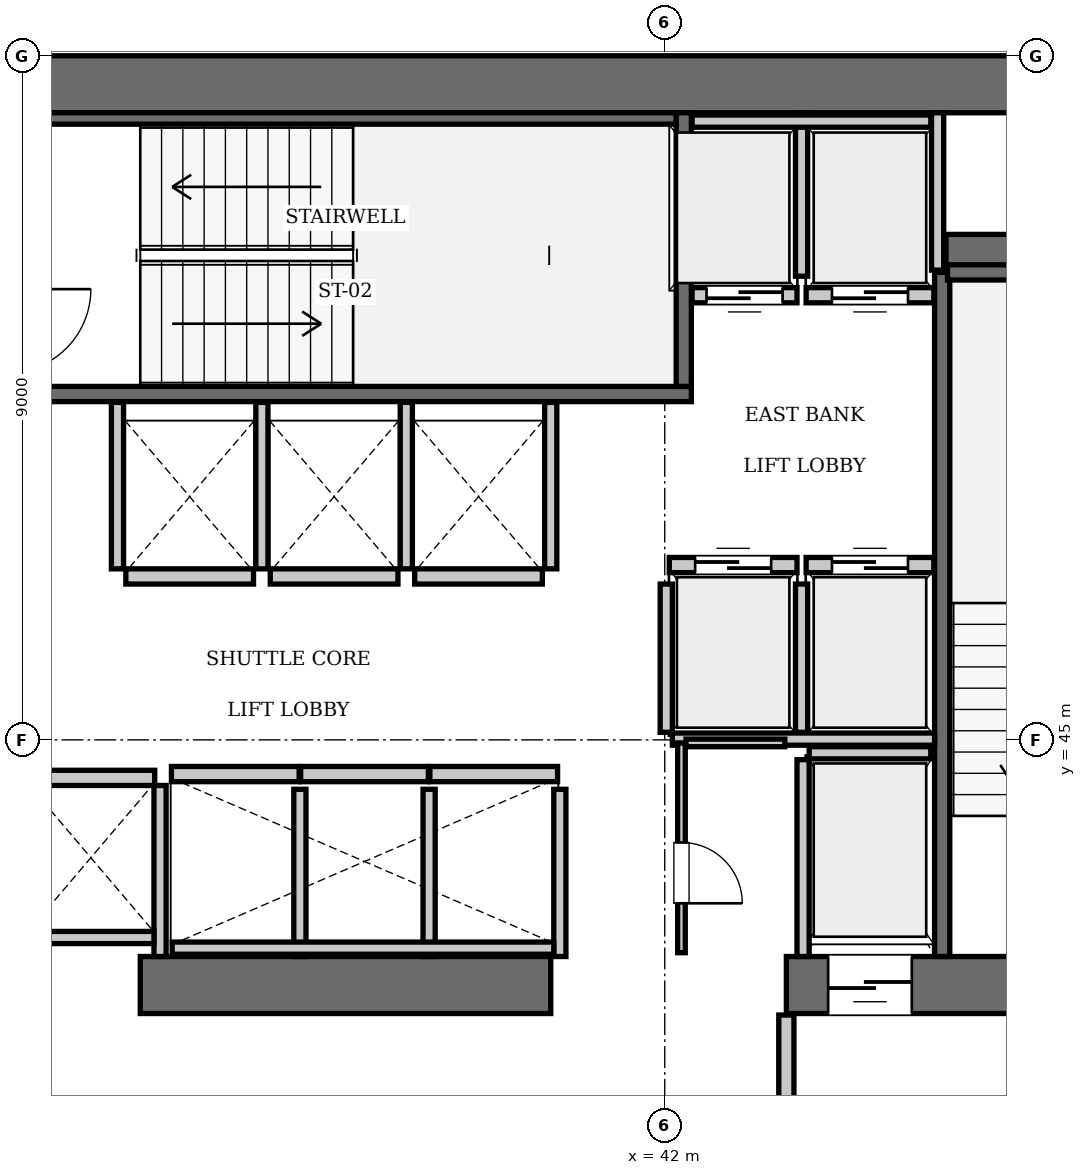
"""IFC4 building model, lengths in metres.
Left out: names, types, materials, properties, quantities, classifications, styles, units other than length and angle.
Written with IfcOpenShell. Run it as: python <this file> out.ifc"""

import sys

from ifc_helpers import new_model, si_unit, direction, frame, frame_2d, origin, place, context, subcontext, project, spatial, rectangle, extrude, element, fill, save


model = new_model("IFC4")
c1 = context("Model", 3, precision=1e-05, world=origin(), true_north=direction((0.0, 1.0)))
c2 = subcontext(c1, "Body", "Model", "MODEL_VIEW")
j1 = project(units=[si_unit("LENGTHUNIT", "METRE"), si_unit("PLANEANGLEUNIT", "RADIAN")], contexts=[c1])
p1 = place(None, origin())
s1 = spatial("IfcSite", under=j1, at=p1, CompositionType="ELEMENT")
p2 = place(p1, origin())
s2 = spatial("IfcBuilding", under=s1, at=p2, CompositionType="ELEMENT")
p3 = place(p2, frame((0.0, 0.0, 212.1)))
s3 = spatial("IfcBuildingStorey", under=s2, at=p3, CompositionType="ELEMENT", Elevation=212.1)
p4 = place(p3, frame((25.2, 53.625, 0.0), z_axis=(0.0, 0.0, 1.0), x_axis=(1.0, 0.0, 0.0)))
e1 = element("IfcWall", 1, at=p4, inside=s3, PredefinedType="SHEAR", context=c2, shape_type="SweptSolid", body=[
    extrude(rectangle(XDim=25.2, YDim=0.75, at=frame_2d((12.6, 0.0))), origin(), (0.0, 0.0, 1.0), 3.85),
])
p5 = place(p3, frame((35.1, 41.775, 0.0), z_axis=(0.0, 0.0, 1.0), x_axis=(1.0, 0.0, 0.0)))
e2 = element("IfcWall", 2, at=p5, inside=s3, PredefinedType="SHEAR", context=c2, shape_type="SweptSolid", body=[
    extrude(rectangle(XDim=5.4, YDim=0.75, at=frame_2d((2.7, 0.0))), origin(), (0.0, 0.0, 1.0), 3.85),
])
p6 = place(p3, frame((43.6, 41.775, 0.0), z_axis=(0.0, 0.0, 1.0), x_axis=(1.0, 0.0, 0.0)))
e3 = element("IfcWall", 3, at=p6, inside=s3, PredefinedType="SHEAR", context=c2, shape_type="SweptSolid", body=[
    extrude(rectangle(XDim=6.8, YDim=0.75, at=frame_2d((3.4, 0.0))), origin(), (0.0, 0.0, 1.0), 3.85),
])
p7 = place(p6, frame((3.9, 0.0, 0.0)))
e4 = element("IfcOpeningElement", 4, at=p7, cuts=e3, PredefinedType="OPENING", context=c2, shape_type="SweptSolid", body=[
    extrude(rectangle(XDim=1.15, YDim=2.15, at=frame_2d((0.575, 1.075))), frame((0.0, 0.385, 0.0), z_axis=(0.0, -1.0, 0.0), x_axis=(1.0, 0.0, 0.0)), (0.0, 0.0, 1.0), 0.77),
])
p8 = place(p6, frame((0.55, 0.0, 0.0)))
e5 = element("IfcOpeningElement", 5, at=p8, cuts=e3, PredefinedType="OPENING", context=c2, shape_type="SweptSolid", body=[
    extrude(rectangle(XDim=1.1, YDim=2.2, at=frame_2d((0.55, 1.1))), frame((0.0, 0.385, 0.0), z_axis=(0.0, -1.0, 0.0), x_axis=(1.0, 0.0, 0.0)), (0.0, 0.0, 1.0), 0.77),
])
p9 = place(p3, frame((45.7, 51.4, 0.0), z_axis=(0.0, 0.0, 1.0), x_axis=(1.0, 0.0, 0.0)))
e6 = element("IfcWall", 6, at=p9, inside=s3, PredefinedType="SHEAR", context=c2, shape_type="SweptSolid", body=[
    extrude(rectangle(XDim=3.95, YDim=0.5, at=frame_2d((1.975, 0.0))), origin(), (0.0, 0.0, 1.0), 3.85),
])
p10 = place(p3, frame((33.25, 49.55, 0.0), z_axis=(0.0, 0.0, 1.0), x_axis=(1.0, 0.0, 0.0)))
e7 = element("IfcWall", 7, at=p10, inside=s3, PredefinedType="SOLIDWALL", context=c2, shape_type="SweptSolid", body=[
    extrude(rectangle(XDim=9.1, YDim=0.2, at=frame_2d((4.55, 0.0))), origin(), (0.0, 0.0, 1.0), 3.61),
])
p11 = place(p3, frame((42.25, 49.65, 0.0), z_axis=(0.0, 0.0, 1.0), x_axis=(0.0, 1.0, 0.0)))
e8 = element("IfcWall", 8, at=p11, inside=s3, PredefinedType="SOLIDWALL", context=c2, shape_type="SweptSolid", body=[
    extrude(rectangle(XDim=3.6, YDim=0.2, at=frame_2d((1.8, 0.0))), origin(), (0.0, 0.0, 1.0), 3.61),
])
p12 = place(p3, frame((33.45, 53.175, 0.0), z_axis=(0.0, 0.0, 1.0), x_axis=(1.0, 0.0, 0.0)))
e9 = element("IfcWall", 9, at=p12, inside=s3, PredefinedType="SOLIDWALL", context=c2, shape_type="SweptSolid", body=[
    extrude(rectangle(XDim=8.7, YDim=0.15, at=frame_2d((4.35, 0.0))), origin(), (0.0, 0.0, 1.0), 3.61),
])
p13 = place(p3, frame((45.65, 42.15, 0.0), z_axis=(0.0, 0.0, 1.0), x_axis=(0.0, 1.0, 0.0)))
e10 = element("IfcWall", 10, at=p13, inside=s3, PredefinedType="SOLIDWALL", context=c2, shape_type="SweptSolid", body=[
    extrude(rectangle(XDim=9.0, YDim=0.2, at=frame_2d((4.5, 0.0))), origin(), (0.0, 0.0, 1.0), 3.61),
])
p14 = place(p3, frame((45.72, 51.15, 0.0), z_axis=(0.0, 0.0, 1.0), x_axis=(1.0, 0.0, 0.0)))
e11 = element("IfcWall", 11, at=p14, inside=s3, PredefinedType="SOLIDWALL", context=c2, shape_type="SweptSolid", body=[
    extrude(rectangle(XDim=3.5, YDim=0.2, at=frame_2d((1.75, 0.0))), origin(), (0.0, 0.0, 1.0), 3.61),
])
p15 = place(p3, frame((42.06, 47.3, 0.0), z_axis=(0.0, 0.0, 1.0), x_axis=(1.0, 0.0, 0.0)))
e12 = element("IfcWall", 12, at=p15, inside=s3, PredefinedType="SOLIDWALL", context=c2, shape_type="SweptSolid", body=[
    extrude(rectangle(XDim=1.68, YDim=0.2, at=frame_2d((0.84, 0.0))), origin(), (0.0, 0.0, 1.0), 3.61),
])
p16 = place(p15, frame((0.34, 0.0, 0.0)))
e13 = element("IfcOpeningElement", 13, at=p16, cuts=e12, PredefinedType="OPENING", context=c2, shape_type="SweptSolid", body=[
    extrude(rectangle(XDim=1.0, YDim=2.15, at=frame_2d((0.5, 1.075))), frame((0.0, 0.11, 0.0), z_axis=(0.0, -1.0, 0.0), x_axis=(1.0, 0.0, 0.0)), (0.0, 0.0, 1.0), 0.22),
])
p17 = place(p3, frame((43.86, 47.3, 0.0), z_axis=(0.0, 0.0, 1.0), x_axis=(1.0, 0.0, 0.0)))
e14 = element("IfcWall", 14, at=p17, inside=s3, PredefinedType="SOLIDWALL", context=c2, shape_type="SweptSolid", body=[
    extrude(rectangle(XDim=1.68, YDim=0.2, at=frame_2d((0.84, 0.0))), origin(), (0.0, 0.0, 1.0), 3.61),
])
p18 = place(p17, frame((0.34, 0.0, 0.0)))
e15 = element("IfcOpeningElement", 15, at=p18, cuts=e14, PredefinedType="OPENING", context=c2, shape_type="SweptSolid", body=[
    extrude(rectangle(XDim=1.0, YDim=2.15, at=frame_2d((0.5, 1.075))), frame((0.0, 0.11, 0.0), z_axis=(0.0, -1.0, 0.0), x_axis=(1.0, 0.0, 0.0)), (0.0, 0.0, 1.0), 0.22),
])
p19 = place(p3, frame((42.36, 50.85, 0.0), z_axis=(0.0, 0.0, 1.0), x_axis=(1.0, 0.0, 0.0)))
e16 = element("IfcWall", 16, at=p19, inside=s3, PredefinedType="SOLIDWALL", context=c2, shape_type="SweptSolid", body=[
    extrude(rectangle(XDim=1.38, YDim=0.2, at=frame_2d((0.69, 0.0))), origin(), (0.0, 0.0, 1.0), 3.61),
])
p20 = place(p19, frame((0.19, 0.0, 0.0)))
e17 = element("IfcOpeningElement", 17, at=p20, cuts=e16, PredefinedType="OPENING", context=c2, shape_type="SweptSolid", body=[
    extrude(rectangle(XDim=1.0, YDim=2.15, at=frame_2d((0.5, 1.075))), frame((0.0, 0.11, 0.0), z_axis=(0.0, -1.0, 0.0), x_axis=(1.0, 0.0, 0.0)), (0.0, 0.0, 1.0), 0.22),
])
p21 = place(p3, frame((43.86, 50.85, 0.0), z_axis=(0.0, 0.0, 1.0), x_axis=(1.0, 0.0, 0.0)))
e18 = element("IfcWall", 18, at=p21, inside=s3, PredefinedType="SOLIDWALL", context=c2, shape_type="SweptSolid", body=[
    extrude(rectangle(XDim=1.68, YDim=0.2, at=frame_2d((0.84, 0.0))), origin(), (0.0, 0.0, 1.0), 3.61),
])
p22 = place(p21, frame((0.34, 0.0, 0.0)))
e19 = element("IfcOpeningElement", 19, at=p22, cuts=e18, PredefinedType="OPENING", context=c2, shape_type="SweptSolid", body=[
    extrude(rectangle(XDim=1.0, YDim=2.15, at=frame_2d((0.5, 1.075))), frame((0.0, 0.11, 0.0), z_axis=(0.0, -1.0, 0.0), x_axis=(1.0, 0.0, 0.0)), (0.0, 0.0, 1.0), 0.22),
])
for number, where, z_axis, x_axis in (
    (20, (35.51, 44.55, 0.0), (0.0, 0.0, 1.0), (1.0, 0.0, 0.0)),
    (21, (37.21, 44.55, 0.0), (0.0, 0.0, 1.0), (1.0, 0.0, 0.0)),
):
    element("IfcWall", number, at=place(p3, frame(where, z_axis=z_axis, x_axis=x_axis)), inside=s3, PredefinedType="SOLIDWALL", context=c2, shape_type="SweptSolid", body=[
        extrude(rectangle(XDim=1.68, YDim=0.2, at=frame_2d((0.84, 0.0))), origin(), (0.0, 0.0, 1.0), 3.61),
    ])
for number, where, z_axis, x_axis in (
    (22, (38.91, 44.55, 0.0), (0.0, 0.0, 1.0), (1.0, 0.0, 0.0)),
    (23, (34.91, 47.15, 0.0), (0.0, 0.0, 1.0), (1.0, 0.0, 0.0)),
):
    element("IfcWall", number, at=place(p3, frame(where, z_axis=z_axis, x_axis=x_axis)), inside=s3, PredefinedType="SOLIDWALL", context=c2, shape_type="SweptSolid", body=[
        extrude(rectangle(XDim=1.68, YDim=0.2, at=frame_2d((0.84, 0.0))), origin(), (0.0, 0.0, 1.0), 3.61),
    ])
for number, where, z_axis, x_axis in (
    (24, (36.81, 47.15, 0.0), (0.0, 0.0, 1.0), (1.0, 0.0, 0.0)),
    (25, (38.71, 47.15, 0.0), (0.0, 0.0, 1.0), (1.0, 0.0, 0.0)),
    (26, (33.61, 44.5, 0.0), (0.0, 0.0, 1.0), (1.0, 0.0, 0.0)),
):
    element("IfcWall", number, at=place(p3, frame(where, z_axis=z_axis, x_axis=x_axis)), inside=s3, PredefinedType="SOLIDWALL", context=c2, shape_type="SweptSolid", body=[
        extrude(rectangle(XDim=1.68, YDim=0.2, at=frame_2d((0.84, 0.0))), origin(), (0.0, 0.0, 1.0), 3.61),
    ])
p23 = place(p3, frame((43.9, 44.83, 0.0), z_axis=(0.0, 0.0, 1.0), x_axis=(1.0, 0.0, 0.0)))
e27 = element("IfcWall", 27, at=p23, inside=s3, PredefinedType="SOLIDWALL", context=c2, shape_type="SweptSolid", body=[
    extrude(rectangle(XDim=1.6, YDim=0.16, at=frame_2d((0.8, 0.0))), origin(), (0.0, 0.0, 1.0), 3.61),
])
p24 = place(p3, frame((43.82, 42.15, 0.0), z_axis=(0.0, 0.0, 1.0), x_axis=(0.0, 1.0, 0.0)))
e28 = element("IfcWall", 28, at=p24, inside=s3, PredefinedType="SOLIDWALL", context=c2, shape_type="SweptSolid", body=[
    extrude(rectangle(XDim=2.59, YDim=0.16, at=frame_2d((1.295, 0.0))), origin(), (0.0, 0.0, 1.0), 3.61),
])
for number, where, z_axis, x_axis in (
    (29, (42.02, 45.1, 0.0), (0.0, 0.0, 1.0), (0.0, 1.0, 0.0)),
    (30, (43.8, 45.1, 0.0), (0.0, 0.0, 1.0), (0.0, 1.0, 0.0)),
):
    element("IfcWall", number, at=place(p3, frame(where, z_axis=z_axis, x_axis=x_axis)), inside=s3, PredefinedType="SOLIDWALL", context=c2, shape_type="SweptSolid", body=[
        extrude(rectangle(XDim=1.95, YDim=0.16, at=frame_2d((0.975, 0.0))), origin(), (0.0, 0.0, 1.0), 3.61),
    ])
p25 = place(p3, frame((42.1, 45.01, 0.0), z_axis=(0.0, 0.0, 1.0), x_axis=(1.0, 0.0, 0.0)))
e31 = element("IfcWall", 31, at=p25, inside=s3, PredefinedType="SOLIDWALL", context=c2, shape_type="SweptSolid", body=[
    extrude(rectangle(XDim=3.45, YDim=0.16, at=frame_2d((1.725, 0.0))), origin(), (0.0, 0.0, 1.0), 3.61),
])
p26 = place(p3, frame((45.59, 51.18, 0.0), z_axis=(0.0, 0.0, 1.0), x_axis=(0.0, 1.0, 0.0)))
e32 = element("IfcWall", 32, at=p26, inside=s3, PredefinedType="SOLIDWALL", context=c2, shape_type="SweptSolid", body=[
    extrude(rectangle(XDim=2.07, YDim=0.16, at=frame_2d((1.035, 0.0))), origin(), (0.0, 0.0, 1.0), 3.61),
])
p27 = place(p3, frame((43.8, 51.1, 0.0), z_axis=(0.0, 0.0, 1.0), x_axis=(0.0, 1.0, 0.0)))
e33 = element("IfcWall", 33, at=p27, inside=s3, PredefinedType="SOLIDWALL", context=c2, shape_type="SweptSolid", body=[
    extrude(rectangle(XDim=2.15, YDim=0.16, at=frame_2d((1.075, 0.0))), origin(), (0.0, 0.0, 1.0), 3.61),
])
p28 = place(p3, frame((42.36, 53.14, 0.0), z_axis=(0.0, 0.0, 1.0), x_axis=(1.0, 0.0, 0.0)))
e34 = element("IfcWall", 34, at=p28, inside=s3, PredefinedType="SOLIDWALL", context=c2, shape_type="SweptSolid", body=[
    extrude(rectangle(XDim=3.14, YDim=0.16, at=frame_2d((1.57, 0.0))), origin(), (0.0, 0.0, 1.0), 3.61),
])
for number, where, z_axis, x_axis in (
    (35, (37.2, 42.15, 0.0), (0.0, 0.0, 1.0), (0.0, 1.0, 0.0)),
    (36, (38.9, 42.15, 0.0), (0.0, 0.0, 1.0), (0.0, 1.0, 0.0)),
    (37, (40.62, 42.15, 0.0), (0.0, 0.0, 1.0), (0.0, 1.0, 0.0)),
):
    element("IfcWall", number, at=place(p3, frame(where, z_axis=z_axis, x_axis=x_axis)), inside=s3, PredefinedType="SOLIDWALL", context=c2, shape_type="SweptSolid", body=[
        extrude(rectangle(XDim=2.2, YDim=0.16, at=frame_2d((1.1, 0.0))), origin(), (0.0, 0.0, 1.0), 3.61),
    ])
p29 = place(p3, frame((35.52, 42.26, 0.0), z_axis=(0.0, 0.0, 1.0), x_axis=(1.0, 0.0, 0.0)))
e38 = element("IfcWall", 38, at=p29, inside=s3, PredefinedType="SOLIDWALL", context=c2, shape_type="SweptSolid", body=[
    extrude(rectangle(XDim=5.02, YDim=0.16, at=frame_2d((2.51, 0.0))), origin(), (0.0, 0.0, 1.0), 3.61),
])
for number, where, z_axis, x_axis in (
    (39, (34.8, 47.25, 0.0), (0.0, 0.0, 1.0), (0.0, 1.0, 0.0)),
    (40, (36.7, 47.25, 0.0), (0.0, 0.0, 1.0), (0.0, 1.0, 0.0)),
    (41, (38.6, 47.25, 0.0), (0.0, 0.0, 1.0), (0.0, 1.0, 0.0)),
    (42, (40.5, 47.25, 0.0), (0.0, 0.0, 1.0), (0.0, 1.0, 0.0)),
):
    element("IfcWall", number, at=place(p3, frame(where, z_axis=z_axis, x_axis=x_axis)), inside=s3, PredefinedType="SOLIDWALL", context=c2, shape_type="SweptSolid", body=[
        extrude(rectangle(XDim=2.19, YDim=0.16, at=frame_2d((1.095, 0.0))), origin(), (0.0, 0.0, 1.0), 3.61),
    ])
p30 = place(p3, frame((35.36, 42.15, 0.0), z_axis=(0.0, 0.0, 1.0), x_axis=(0.0, 1.0, 0.0)))
e43 = element("IfcWall", 43, at=p30, inside=s3, PredefinedType="SOLIDWALL", context=c2, shape_type="SweptSolid", body=[
    extrude(rectangle(XDim=2.25, YDim=0.16, at=frame_2d((1.125, 0.0))), origin(), (0.0, 0.0, 1.0), 3.61),
])
p31 = place(p3, frame((33.62, 42.4, 0.0), z_axis=(0.0, 0.0, 1.0), x_axis=(1.0, 0.0, 0.0)))
e44 = element("IfcWall", 44, at=p31, inside=s3, PredefinedType="SOLIDWALL", context=c2, shape_type="SweptSolid", body=[
    extrude(rectangle(XDim=1.66, YDim=0.16, at=frame_2d((0.83, 0.0))), origin(), (0.0, 0.0, 1.0), 3.61),
])
p32 = place(p3, frame((43.6, 38.31, 0.0), z_axis=(0.0, 0.0, 1.0), x_axis=(0.0, 1.0, 0.0)))
e45 = element("IfcWall", 45, at=p32, inside=s3, PredefinedType="PARTITIONING", context=c2, shape_type="SweptSolid", body=[
    extrude(rectangle(XDim=3.07, YDim=0.2, at=frame_2d((1.535, 0.0))), origin(), (0.0, 0.0, 1.0), 3.61),
])
p33 = place(p3, frame((42.22, 42.2, 0.0), z_axis=(0.0, 0.0, 1.0), x_axis=(0.0, 1.0, 0.0)))
e46 = element("IfcWall", 46, at=p33, inside=s3, PredefinedType="PARTITIONING", context=c2, shape_type="SweptSolid", body=[
    extrude(rectangle(XDim=2.76, YDim=0.1, at=frame_2d((1.38, 0.0))), origin(), (0.0, 0.0, 1.0), 3.61),
])
p34 = place(p33, frame((0.65, 0.0, 0.0)))
e47 = element("IfcOpeningElement", 47, at=p34, cuts=e46, PredefinedType="OPENING", context=c2, shape_type="SweptSolid", body=[
    extrude(rectangle(XDim=0.8, YDim=2.05, at=frame_2d((0.4, 1.025))), frame((0.0, 0.06, 0.0), z_axis=(0.0, -1.0, 0.0), x_axis=(1.0, 0.0, 0.0)), (0.0, 0.0, 1.0), 0.12),
])
p35 = place(p3, frame((42.28, 44.96, 0.0), z_axis=(0.0, 0.0, 1.0), x_axis=(1.0, 0.0, 0.0)))
e48 = element("IfcWall", 48, at=p35, inside=s3, PredefinedType="PARTITIONING", context=c2, shape_type="SweptSolid", body=[
    extrude(rectangle(XDim=1.3, YDim=0.1, at=frame_2d((0.65, 0.0))), origin(), (0.0, 0.0, 1.0), 3.61),
])
p36 = place(p16, origin())
e49 = element("IfcDoor", 49, at=p36, inside=s3, OperationType="SLIDING_TO_LEFT", PredefinedType="DOOR", context=c2, shape_type="SweptSolid", body=[
    extrude(rectangle(XDim=1.0, YDim=2.15, at=frame_2d((0.5, 1.075))), frame((0.0, 0.025, 0.0), z_axis=(0.0, -1.0, 0.0), x_axis=(1.0, 0.0, 0.0)), (0.0, 0.0, 1.0), 0.05),
])
fill(e13, e49)
p37 = place(p18, origin())
e50 = element("IfcDoor", 50, at=p37, inside=s3, OperationType="SLIDING_TO_LEFT", PredefinedType="DOOR", context=c2, shape_type="SweptSolid", body=[
    extrude(rectangle(XDim=1.0, YDim=2.15, at=frame_2d((0.5, 1.075))), frame((0.0, 0.025, 0.0), z_axis=(0.0, -1.0, 0.0), x_axis=(1.0, 0.0, 0.0)), (0.0, 0.0, 1.0), 0.05),
])
fill(e15, e50)
p38 = place(p20, frame((1.0, 0.0, 0.0), z_axis=(0.0, 0.0, 1.0), x_axis=(-1.0, 0.0, 0.0)))
e51 = element("IfcDoor", 51, at=p38, inside=s3, OperationType="SLIDING_TO_LEFT", PredefinedType="DOOR", context=c2, shape_type="SweptSolid", body=[
    extrude(rectangle(XDim=1.0, YDim=2.15, at=frame_2d((0.5, 1.075))), frame((0.0, 0.025, 0.0), z_axis=(0.0, -1.0, 0.0), x_axis=(1.0, 0.0, 0.0)), (0.0, 0.0, 1.0), 0.05),
])
fill(e17, e51)
p39 = place(p22, frame((1.0, 0.0, 0.0), z_axis=(0.0, 0.0, 1.0), x_axis=(-1.0, 0.0, 0.0)))
e52 = element("IfcDoor", 52, at=p39, inside=s3, OperationType="SLIDING_TO_LEFT", PredefinedType="DOOR", context=c2, shape_type="SweptSolid", body=[
    extrude(rectangle(XDim=1.0, YDim=2.15, at=frame_2d((0.5, 1.075))), frame((0.0, 0.025, 0.0), z_axis=(0.0, -1.0, 0.0), x_axis=(1.0, 0.0, 0.0)), (0.0, 0.0, 1.0), 0.05),
])
fill(e19, e52)
p40 = place(p8, frame((1.1, 0.0, 0.0), z_axis=(0.0, 0.0, 1.0), x_axis=(-1.0, 0.0, 0.0)))
e53 = element("IfcDoor", 53, at=p40, inside=s3, OperationType="SLIDING_TO_LEFT", PredefinedType="DOOR", context=c2, shape_type="SweptSolid", body=[
    extrude(rectangle(XDim=1.1, YDim=2.2, at=frame_2d((0.55, 1.1))), frame((0.0, 0.025, 0.0), z_axis=(0.0, -1.0, 0.0), x_axis=(1.0, 0.0, 0.0)), (0.0, 0.0, 1.0), 0.05),
])
fill(e5, e53)
p41 = place(p34, frame((0.8, 0.0, 0.0), z_axis=(0.0, 0.0, 1.0), x_axis=(-1.0, 0.0, 0.0)))
e54 = element("IfcDoor", 54, at=p41, inside=s3, OperationType="SINGLE_SWING_RIGHT", PredefinedType="DOOR", context=c2, shape_type="SweptSolid", body=[
    extrude(rectangle(XDim=0.8, YDim=2.05, at=frame_2d((0.4, 1.025))), frame((0.0, 0.025, 0.0), z_axis=(0.0, -1.0, 0.0), x_axis=(1.0, 0.0, 0.0)), (0.0, 0.0, 1.0), 0.05),
])
fill(e47, e54)
save(model, sys.argv[1])
